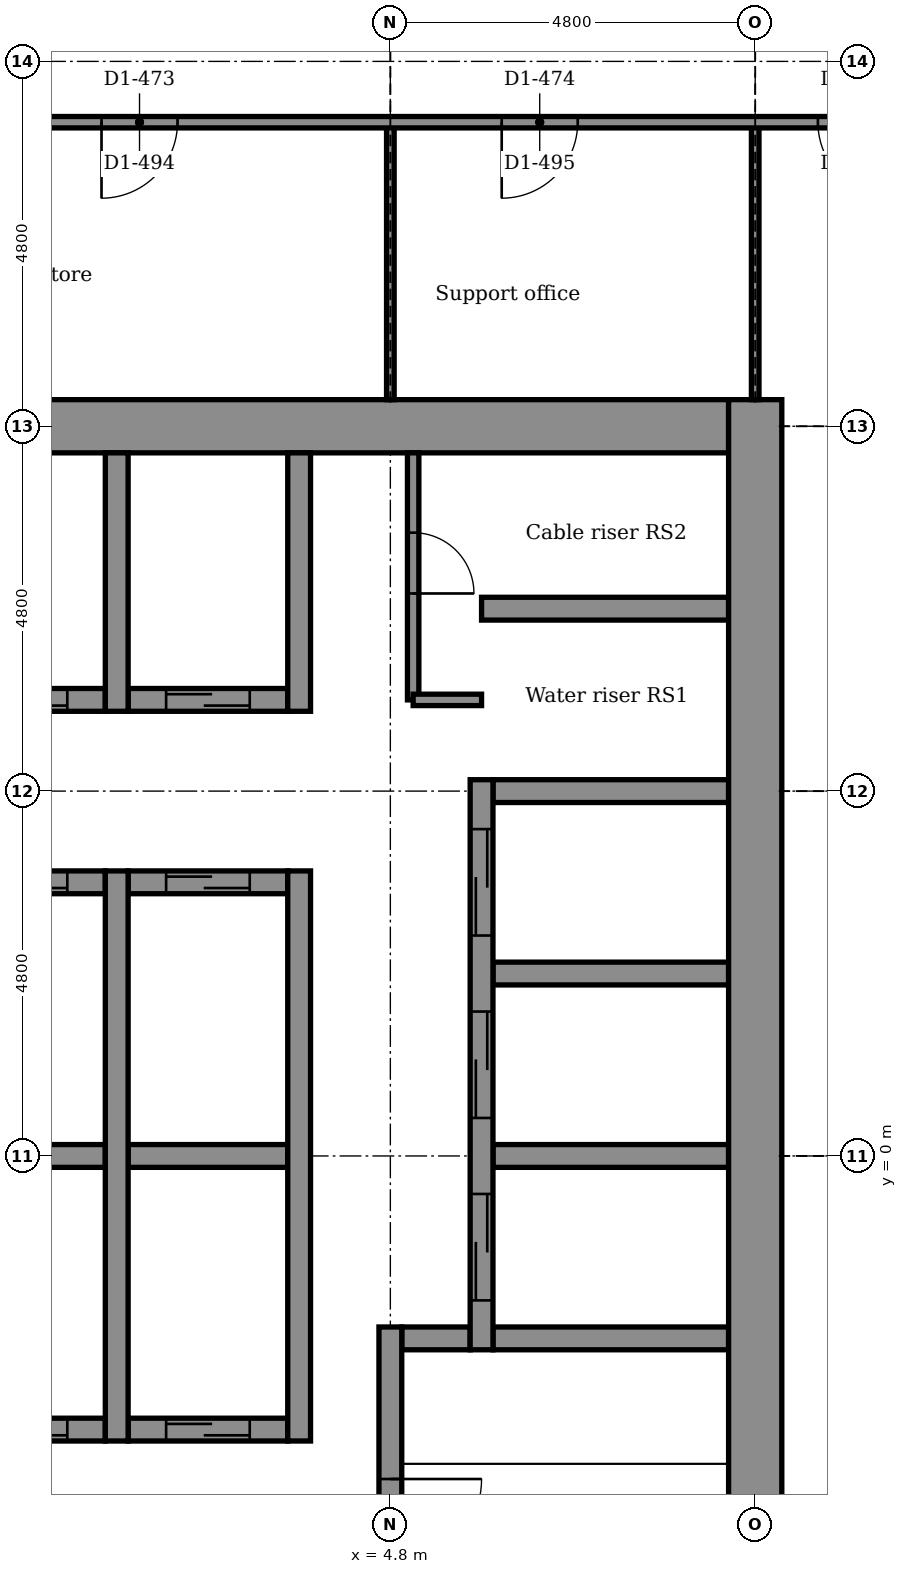
"""IFC4 building model, lengths in metres.
Left out: names, types, materials, properties, quantities, classifications, styles, units other than length and angle.
Written with IfcOpenShell. Run it as: python <this file> out.ifc"""

import sys

from ifc_helpers import new_model, si_unit, direction, frame, frame_2d, origin, place, context, subcontext, project, spatial, rectangle, extrude, element, fill, save


model = new_model("IFC4")
c1 = context("Model", 3, precision=1e-05, world=origin(), true_north=direction((0.0, 1.0)))
c2 = subcontext(c1, "Body", "Model", "MODEL_VIEW")
j1 = project(units=[si_unit("LENGTHUNIT", "METRE"), si_unit("PLANEANGLEUNIT", "RADIAN")], contexts=[c1])
p1 = place(None, origin())
s1 = spatial("IfcSite", under=j1, at=p1, CompositionType="ELEMENT")
p2 = place(p1, origin())
s2 = spatial("IfcBuilding", under=s1, at=p2, CompositionType="ELEMENT")
p3 = place(p2, frame((0.0, 0.0, 170.0)))
s3 = spatial("IfcBuildingStorey", under=s2, at=p3, CompositionType="ELEMENT", Elevation=170.0)
p4 = place(p3, frame((-1.05, -3.6, -0.15), z_axis=(0.0, 0.0, 1.0), x_axis=(1.0, 0.0, 0.0)))
e1 = element("IfcWall", 1, at=p4, inside=s3, PredefinedType="STANDARD", context=c2, shape_type="SweptSolid", body=[
    extrude(rectangle(XDim=2.1, YDim=0.3, at=frame_2d((1.05, 0.0))), origin(), (0.0, 0.0, 1.0), 3.9),
])
p5 = place(p4, frame((0.5, 0.0, 0.15)))
e2 = element("IfcOpeningElement", 2, at=p5, cuts=e1, PredefinedType="OPENING", context=c2, shape_type="SweptSolid", body=[
    extrude(rectangle(XDim=1.1, YDim=2.1, at=frame_2d((0.55, 1.05))), frame((0.0, 0.16, 0.0), z_axis=(0.0, -1.0, 0.0), x_axis=(1.0, 0.0, 0.0)), (0.0, 0.0, 1.0), 0.32),
])
p6 = place(p3, frame((1.35, -3.6, -0.15), z_axis=(0.0, 0.0, 1.0), x_axis=(1.0, 0.0, 0.0)))
e3 = element("IfcWall", 3, at=p6, inside=s3, PredefinedType="STANDARD", context=c2, shape_type="SweptSolid", body=[
    extrude(rectangle(XDim=2.1, YDim=0.3, at=frame_2d((1.05, 0.0))), origin(), (0.0, 0.0, 1.0), 3.9),
])
p7 = place(p6, frame((0.5, 0.0, 0.15)))
e4 = element("IfcOpeningElement", 4, at=p7, cuts=e3, PredefinedType="OPENING", context=c2, shape_type="SweptSolid", body=[
    extrude(rectangle(XDim=1.1, YDim=2.1, at=frame_2d((0.55, 1.05))), frame((0.0, 0.16, 0.0), z_axis=(0.0, -1.0, 0.0), x_axis=(1.0, 0.0, 0.0)), (0.0, 0.0, 1.0), 0.32),
])
p8 = place(p3, frame((4.95, -2.4, -0.15), z_axis=(0.0, 0.0, 1.0), x_axis=(1.0, 0.0, 0.0)))
e5 = element("IfcWall", 5, at=p8, inside=s3, PredefinedType="STANDARD", context=c2, shape_type="SweptSolid", body=[
    extrude(rectangle(XDim=0.9, YDim=0.3, at=frame_2d((0.45, 0.0))), origin(), (0.0, 0.0, 1.0), 3.9),
])
p9 = place(p3, frame((6.15, -2.4, -0.15), z_axis=(0.0, 0.0, 1.0), x_axis=(1.0, 0.0, 0.0)))
e6 = element("IfcWall", 6, at=p9, inside=s3, PredefinedType="STANDARD", context=c2, shape_type="SweptSolid", body=[
    extrude(rectangle(XDim=3.1, YDim=0.3, at=frame_2d((1.55, 0.0))), origin(), (0.0, 0.0, 1.0), 3.9),
])
p10 = place(p3, frame((-1.05, 0.0, -0.15), z_axis=(0.0, 0.0, 1.0), x_axis=(1.0, 0.0, 0.0)))
e7 = element("IfcWall", 7, at=p10, inside=s3, PredefinedType="STANDARD", context=c2, shape_type="SweptSolid", body=[
    extrude(rectangle(XDim=2.1, YDim=0.3, at=frame_2d((1.05, 0.0))), origin(), (0.0, 0.0, 1.0), 3.9),
])
p11 = place(p3, frame((1.35, 0.0, -0.15), z_axis=(0.0, 0.0, 1.0), x_axis=(1.0, 0.0, 0.0)))
e8 = element("IfcWall", 8, at=p11, inside=s3, PredefinedType="STANDARD", context=c2, shape_type="SweptSolid", body=[
    extrude(rectangle(XDim=2.1, YDim=0.3, at=frame_2d((1.05, 0.0))), origin(), (0.0, 0.0, 1.0), 3.9),
])
for number, where, z_axis, x_axis in (
    (9, (6.15, 0.0, -0.15), (0.0, 0.0, 1.0), (1.0, 0.0, 0.0)),
    (10, (6.15, 2.4, -0.15), (0.0, 0.0, 1.0), (1.0, 0.0, 0.0)),
):
    element("IfcWall", number, at=place(p3, frame(where, z_axis=z_axis, x_axis=x_axis)), inside=s3, PredefinedType="STANDARD", context=c2, shape_type="SweptSolid", body=[
        extrude(rectangle(XDim=3.1, YDim=0.3, at=frame_2d((1.55, 0.0))), origin(), (0.0, 0.0, 1.0), 3.9),
    ])
p12 = place(p3, frame((-1.05, 3.6, -0.15), z_axis=(0.0, 0.0, 1.0), x_axis=(1.0, 0.0, 0.0)))
e11 = element("IfcWall", 11, at=p12, inside=s3, PredefinedType="STANDARD", context=c2, shape_type="SweptSolid", body=[
    extrude(rectangle(XDim=2.1, YDim=0.3, at=frame_2d((1.05, 0.0))), origin(), (0.0, 0.0, 1.0), 3.9),
])
p13 = place(p12, frame((0.5, 0.0, 0.15)))
e12 = element("IfcOpeningElement", 12, at=p13, cuts=e11, PredefinedType="OPENING", context=c2, shape_type="SweptSolid", body=[
    extrude(rectangle(XDim=1.1, YDim=2.1, at=frame_2d((0.55, 1.05))), frame((0.0, 0.16, 0.0), z_axis=(0.0, -1.0, 0.0), x_axis=(1.0, 0.0, 0.0)), (0.0, 0.0, 1.0), 0.32),
])
p14 = place(p3, frame((1.35, 3.6, -0.15), z_axis=(0.0, 0.0, 1.0), x_axis=(1.0, 0.0, 0.0)))
e13 = element("IfcWall", 13, at=p14, inside=s3, PredefinedType="STANDARD", context=c2, shape_type="SweptSolid", body=[
    extrude(rectangle(XDim=2.1, YDim=0.3, at=frame_2d((1.05, 0.0))), origin(), (0.0, 0.0, 1.0), 3.9),
])
p15 = place(p14, frame((0.5, 0.0, 0.15)))
e14 = element("IfcOpeningElement", 14, at=p15, cuts=e13, PredefinedType="OPENING", context=c2, shape_type="SweptSolid", body=[
    extrude(rectangle(XDim=1.1, YDim=2.1, at=frame_2d((0.55, 1.05))), frame((0.0, 0.16, 0.0), z_axis=(0.0, -1.0, 0.0), x_axis=(1.0, 0.0, 0.0)), (0.0, 0.0, 1.0), 0.32),
])
p16 = place(p3, frame((6.15, 4.8, -0.15), z_axis=(0.0, 0.0, 1.0), x_axis=(1.0, 0.0, 0.0)))
e15 = element("IfcWall", 15, at=p16, inside=s3, PredefinedType="STANDARD", context=c2, shape_type="SweptSolid", body=[
    extrude(rectangle(XDim=3.1, YDim=0.3, at=frame_2d((1.55, 0.0))), origin(), (0.0, 0.0, 1.0), 3.9),
])
p17 = place(p3, frame((-1.05, 6.0, -0.15), z_axis=(0.0, 0.0, 1.0), x_axis=(1.0, 0.0, 0.0)))
e16 = element("IfcWall", 16, at=p17, inside=s3, PredefinedType="STANDARD", context=c2, shape_type="SweptSolid", body=[
    extrude(rectangle(XDim=2.1, YDim=0.3, at=frame_2d((1.05, 0.0))), origin(), (0.0, 0.0, 1.0), 3.9),
])
p18 = place(p17, frame((0.5, 0.0, 0.15)))
e17 = element("IfcOpeningElement", 17, at=p18, cuts=e16, PredefinedType="OPENING", context=c2, shape_type="SweptSolid", body=[
    extrude(rectangle(XDim=1.1, YDim=2.1, at=frame_2d((0.55, 1.05))), frame((0.0, 0.16, 0.0), z_axis=(0.0, -1.0, 0.0), x_axis=(1.0, 0.0, 0.0)), (0.0, 0.0, 1.0), 0.32),
])
p19 = place(p3, frame((1.35, 6.0, -0.15), z_axis=(0.0, 0.0, 1.0), x_axis=(1.0, 0.0, 0.0)))
e18 = element("IfcWall", 18, at=p19, inside=s3, PredefinedType="STANDARD", context=c2, shape_type="SweptSolid", body=[
    extrude(rectangle(XDim=2.1, YDim=0.3, at=frame_2d((1.05, 0.0))), origin(), (0.0, 0.0, 1.0), 3.9),
])
p20 = place(p19, frame((0.5, 0.0, 0.15)))
e19 = element("IfcOpeningElement", 19, at=p20, cuts=e18, PredefinedType="OPENING", context=c2, shape_type="SweptSolid", body=[
    extrude(rectangle(XDim=1.1, YDim=2.1, at=frame_2d((0.55, 1.05))), frame((0.0, 0.16, 0.0), z_axis=(0.0, -1.0, 0.0), x_axis=(1.0, 0.0, 0.0)), (0.0, 0.0, 1.0), 0.32),
])
p21 = place(p3, frame((6.0, 7.2, -0.15), z_axis=(0.0, 0.0, 1.0), x_axis=(1.0, 0.0, 0.0)))
e20 = element("IfcWall", 20, at=p21, inside=s3, PredefinedType="STANDARD", context=c2, shape_type="SweptSolid", body=[
    extrude(rectangle(XDim=3.25, YDim=0.3, at=frame_2d((1.625, 0.0))), origin(), (0.0, 0.0, 1.0), 3.9),
])
p22 = place(p3, frame((-5.25, 9.6, -0.15), z_axis=(0.0, 0.0, 1.0), x_axis=(1.0, 0.0, 0.0)))
e21 = element("IfcWall", 21, at=p22, inside=s3, PredefinedType="SHEAR", context=c2, shape_type="SweptSolid", body=[
    extrude(rectangle(XDim=14.5, YDim=0.7, at=frame_2d((7.25, 0.0))), origin(), (0.0, 0.0, 1.0), 3.9),
])
p23 = place(p22, frame((0.6, 0.0, 0.15)))
e22 = element("IfcOpeningElement", 22, at=p23, cuts=e21, PredefinedType="OPENING", context=c2, shape_type="SweptSolid", body=[
    extrude(rectangle(XDim=0.9, YDim=2.1, at=frame_2d((0.45, 1.05))), frame((0.0, 0.36, 0.0), z_axis=(0.0, -1.0, 0.0), x_axis=(1.0, 0.0, 0.0)), (0.0, 0.0, 1.0), 0.72),
])
p24 = place(p3, frame((1.2, -3.75, -0.15), z_axis=(0.0, 0.0, 1.0), x_axis=(0.0, 1.0, 0.0)))
e23 = element("IfcWall", 23, at=p24, inside=s3, PredefinedType="STANDARD", context=c2, shape_type="SweptSolid", body=[
    extrude(rectangle(XDim=7.5, YDim=0.3, at=frame_2d((3.75, 0.0))), origin(), (0.0, 0.0, 1.0), 3.9),
])
p25 = place(p3, frame((1.2, 5.85, -0.15), z_axis=(0.0, 0.0, 1.0), x_axis=(0.0, 1.0, 0.0)))
e24 = element("IfcWall", 24, at=p25, inside=s3, PredefinedType="STANDARD", context=c2, shape_type="SweptSolid", body=[
    extrude(rectangle(XDim=3.4, YDim=0.3, at=frame_2d((1.7, 0.0))), origin(), (0.0, 0.0, 1.0), 3.9),
])
p26 = place(p3, frame((3.6, -3.75, -0.15), z_axis=(0.0, 0.0, 1.0), x_axis=(0.0, 1.0, 0.0)))
e25 = element("IfcWall", 25, at=p26, inside=s3, PredefinedType="STANDARD", context=c2, shape_type="SweptSolid", body=[
    extrude(rectangle(XDim=7.5, YDim=0.3, at=frame_2d((3.75, 0.0))), origin(), (0.0, 0.0, 1.0), 3.9),
])
p27 = place(p3, frame((3.6, 5.85, -0.15), z_axis=(0.0, 0.0, 1.0), x_axis=(0.0, 1.0, 0.0)))
e26 = element("IfcWall", 26, at=p27, inside=s3, PredefinedType="STANDARD", context=c2, shape_type="SweptSolid", body=[
    extrude(rectangle(XDim=3.4, YDim=0.3, at=frame_2d((1.7, 0.0))), origin(), (0.0, 0.0, 1.0), 3.9),
])
p28 = place(p3, frame((4.8, -9.25, -0.15), z_axis=(0.0, 0.0, 1.0), x_axis=(0.0, 1.0, 0.0)))
e27 = element("IfcWall", 27, at=p28, inside=s3, PredefinedType="STANDARD", context=c2, shape_type="SweptSolid", body=[
    extrude(rectangle(XDim=7.0, YDim=0.3, at=frame_2d((3.5, 0.0))), origin(), (0.0, 0.0, 1.0), 3.9),
])
p29 = place(p28, frame((3.8, 0.0, 0.15)))
e28 = element("IfcOpeningElement", 28, at=p29, cuts=e27, PredefinedType="OPENING", context=c2, shape_type="SweptSolid", body=[
    extrude(rectangle(XDim=1.2, YDim=2.1, at=frame_2d((0.6, 1.05))), frame((0.0, 0.16, 0.0), z_axis=(0.0, -1.0, 0.0), x_axis=(1.0, 0.0, 0.0)), (0.0, 0.0, 1.0), 0.32),
])
p30 = place(p3, frame((6.0, -2.55, -0.15), z_axis=(0.0, 0.0, 1.0), x_axis=(0.0, 1.0, 0.0)))
e29 = element("IfcWall", 29, at=p30, inside=s3, PredefinedType="STANDARD", context=c2, shape_type="SweptSolid", body=[
    extrude(rectangle(XDim=7.5, YDim=0.3, at=frame_2d((3.75, 0.0))), origin(), (0.0, 0.0, 1.0), 3.9),
])
p31 = place(p30, frame((0.65, 0.0, 0.15)))
e30 = element("IfcOpeningElement", 30, at=p31, cuts=e29, PredefinedType="OPENING", context=c2, shape_type="SweptSolid", body=[
    extrude(rectangle(XDim=1.4, YDim=2.1, at=frame_2d((0.7, 1.05))), frame((0.0, 0.16, 0.0), z_axis=(0.0, -1.0, 0.0), x_axis=(1.0, 0.0, 0.0)), (0.0, 0.0, 1.0), 0.32),
])
p32 = place(p30, frame((3.05, 0.0, 0.15)))
e31 = element("IfcOpeningElement", 31, at=p32, cuts=e29, PredefinedType="OPENING", context=c2, shape_type="SweptSolid", body=[
    extrude(rectangle(XDim=1.4, YDim=2.1, at=frame_2d((0.7, 1.05))), frame((0.0, 0.16, 0.0), z_axis=(0.0, -1.0, 0.0), x_axis=(1.0, 0.0, 0.0)), (0.0, 0.0, 1.0), 0.32),
])
p33 = place(p30, frame((5.45, 0.0, 0.15)))
e32 = element("IfcOpeningElement", 32, at=p33, cuts=e29, PredefinedType="OPENING", context=c2, shape_type="SweptSolid", body=[
    extrude(rectangle(XDim=1.4, YDim=2.1, at=frame_2d((0.7, 1.05))), frame((0.0, 0.16, 0.0), z_axis=(0.0, -1.0, 0.0), x_axis=(1.0, 0.0, 0.0)), (0.0, 0.0, 1.0), 0.32),
])
p34 = place(p3, frame((9.6, -10.15, -0.15), z_axis=(0.0, 0.0, 1.0), x_axis=(0.0, 1.0, 0.0)))
e33 = element("IfcWall", 33, at=p34, inside=s3, PredefinedType="SHEAR", context=c2, shape_type="SweptSolid", body=[
    extrude(rectangle(XDim=20.1, YDim=0.7, at=frame_2d((10.05, 0.0))), origin(), (0.0, 0.0, 1.0), 3.9),
])
p35 = place(p3, frame((9.6, 9.95, 0.0), z_axis=(0.0, 0.0, 1.0), x_axis=(0.0, 1.0, 0.0)))
e34 = element("IfcWall", 34, at=p35, inside=s3, PredefinedType="PARTITIONING", context=c2, shape_type="SweptSolid", body=[
    extrude(rectangle(XDim=3.65, YDim=0.1, at=frame_2d((1.825, 0.0))), origin(), (0.0, 0.0, 1.0), 3.066),
])
p36 = place(p3, frame((5.1, 6.0, 0.0), z_axis=(0.0, 0.0, 1.0), x_axis=(0.0, 1.0, 0.0)))
e35 = element("IfcWall", 35, at=p36, inside=s3, PredefinedType="PARTITIONING", context=c2, shape_type="SweptSolid", body=[
    extrude(rectangle(XDim=3.25, YDim=0.15, at=frame_2d((1.625, 0.0))), origin(), (0.0, 0.0, 1.0), 3.75),
])
p37 = place(p36, frame((1.4, 0.0, 0.0)))
e36 = element("IfcOpeningElement", 36, at=p37, cuts=e35, PredefinedType="OPENING", context=c2, shape_type="SweptSolid", body=[
    extrude(rectangle(XDim=0.8, YDim=2.1, at=frame_2d((0.4, 1.05))), frame((0.0, 0.085, 0.0), z_axis=(0.0, -1.0, 0.0), x_axis=(1.0, 0.0, 0.0)), (0.0, 0.0, 1.0), 0.17),
])
p38 = place(p3, frame((4.8, 9.95, 0.0), z_axis=(0.0, 0.0, 1.0), x_axis=(0.0, 1.0, 0.0)))
e37 = element("IfcWall", 37, at=p38, inside=s3, PredefinedType="PARTITIONING", context=c2, shape_type="SweptSolid", body=[
    extrude(rectangle(XDim=3.65, YDim=0.1, at=frame_2d((1.825, 0.0))), origin(), (0.0, 0.0, 1.0), 3.066),
])
p39 = place(p3, frame((5.1, 6.0, 0.0), z_axis=(0.0, 0.0, 1.0), x_axis=(1.0, 0.0, 0.0)))
e38 = element("IfcWall", 38, at=p39, inside=s3, PredefinedType="PARTITIONING", context=c2, shape_type="SweptSolid", body=[
    extrude(rectangle(XDim=0.9, YDim=0.15, at=frame_2d((0.45, 0.0))), origin(), (0.0, 0.0, 1.0), 3.75),
])
p40 = place(p3, frame((-1.8, 13.6, 0.0), z_axis=(0.0, 0.0, 1.0), x_axis=(1.0, 0.0, 0.0)))
e39 = element("IfcWall", 39, at=p40, inside=s3, PredefinedType="PARTITIONING", context=c2, shape_type="SweptSolid", body=[
    extrude(rectangle(XDim=19.076, YDim=0.15, at=frame_2d((9.538, 0.0))), origin(), (0.0, 0.0, 1.0), 3.75),
])
p41 = place(p40, frame((2.8, 0.0, 0.0)))
e40 = element("IfcOpeningElement", 40, at=p41, cuts=e39, PredefinedType="OPENING", context=c2, shape_type="SweptSolid", body=[
    extrude(rectangle(XDim=1.0, YDim=2.1, at=frame_2d((0.5, 1.05))), frame((0.0, 0.085, 0.0), z_axis=(0.0, -1.0, 0.0), x_axis=(1.0, 0.0, 0.0)), (0.0, 0.0, 1.0), 0.17),
])
p42 = place(p40, frame((8.065, 0.0, 0.0)))
e41 = element("IfcOpeningElement", 41, at=p42, cuts=e39, PredefinedType="OPENING", context=c2, shape_type="SweptSolid", body=[
    extrude(rectangle(XDim=1.0, YDim=2.1, at=frame_2d((0.5, 1.05))), frame((0.0, 0.085, 0.0), z_axis=(0.0, -1.0, 0.0), x_axis=(1.0, 0.0, 0.0)), (0.0, 0.0, 1.0), 0.17),
])
p43 = place(p40, frame((12.225, 0.0, 0.0)))
e42 = element("IfcOpeningElement", 42, at=p43, cuts=e39, PredefinedType="OPENING", context=c2, shape_type="SweptSolid", body=[
    extrude(rectangle(XDim=1.0, YDim=2.1, at=frame_2d((0.5, 1.05))), frame((0.0, 0.085, 0.0), z_axis=(0.0, -1.0, 0.0), x_axis=(1.0, 0.0, 0.0)), (0.0, 0.0, 1.0), 0.17),
])
p44 = place(p40, frame((15.152, 0.0, 0.0)))
e43 = element("IfcOpeningElement", 43, at=p44, cuts=e39, PredefinedType="OPENING", context=c2, shape_type="SweptSolid", body=[
    extrude(rectangle(XDim=1.8, YDim=2.1, at=frame_2d((0.9, 1.05))), frame((0.0, 0.085, 0.0), z_axis=(0.0, -1.0, 0.0), x_axis=(1.0, 0.0, 0.0)), (0.0, 0.0, 1.0), 0.17),
])
p45 = place(p37, frame((0.8, 0.0, 0.0), z_axis=(0.0, 0.0, 1.0), x_axis=(-1.0, 0.0, 0.0)))
e44 = element("IfcDoor", 44, at=p45, inside=s3, OperationType="SINGLE_SWING_LEFT", PredefinedType="DOOR", context=c2, shape_type="SweptSolid", body=[
    extrude(rectangle(XDim=0.8, YDim=2.1, at=frame_2d((0.4, 1.05))), frame((0.0, 0.025, 0.0), z_axis=(0.0, -1.0, 0.0), x_axis=(1.0, 0.0, 0.0)), (0.0, 0.0, 1.0), 0.05),
])
fill(e36, e44)
p46 = place(p41, frame((1.0, 0.0, 0.0), z_axis=(0.0, 0.0, 1.0), x_axis=(-1.0, 0.0, 0.0)))
e45 = element("IfcDoor", 45, at=p46, inside=s3, OperationType="SINGLE_SWING_LEFT", PredefinedType="DOOR", context=c2, shape_type="SweptSolid", body=[
    extrude(rectangle(XDim=1.0, YDim=2.1, at=frame_2d((0.5, 1.05))), frame((0.0, 0.025, 0.0), z_axis=(0.0, -1.0, 0.0), x_axis=(1.0, 0.0, 0.0)), (0.0, 0.0, 1.0), 0.05),
])
fill(e40, e45)
p47 = place(p42, frame((1.0, 0.0, 0.0), z_axis=(0.0, 0.0, 1.0), x_axis=(-1.0, 0.0, 0.0)))
e46 = element("IfcDoor", 46, at=p47, inside=s3, OperationType="SINGLE_SWING_LEFT", PredefinedType="DOOR", context=c2, shape_type="SweptSolid", body=[
    extrude(rectangle(XDim=1.0, YDim=2.1, at=frame_2d((0.5, 1.05))), frame((0.0, 0.025, 0.0), z_axis=(0.0, -1.0, 0.0), x_axis=(1.0, 0.0, 0.0)), (0.0, 0.0, 1.0), 0.05),
])
fill(e41, e46)
p48 = place(p43, frame((1.0, 0.0, 0.0), z_axis=(0.0, 0.0, 1.0), x_axis=(-1.0, 0.0, 0.0)))
e47 = element("IfcDoor", 47, at=p48, inside=s3, OperationType="SINGLE_SWING_RIGHT", PredefinedType="DOOR", context=c2, shape_type="SweptSolid", body=[
    extrude(rectangle(XDim=1.0, YDim=2.1, at=frame_2d((0.5, 1.05))), frame((0.0, 0.025, 0.0), z_axis=(0.0, -1.0, 0.0), x_axis=(1.0, 0.0, 0.0)), (0.0, 0.0, 1.0), 0.05),
])
fill(e42, e47)
p49 = place(p31, origin())
e48 = element("IfcDoor", 48, at=p49, inside=s3, OperationType="DOUBLE_DOOR_SLIDING", PredefinedType="DOOR", context=c2, shape_type="SweptSolid", body=[
    extrude(rectangle(XDim=1.4, YDim=2.1, at=frame_2d((0.7, 1.05))), frame((0.0, 0.025, 0.0), z_axis=(0.0, -1.0, 0.0), x_axis=(1.0, 0.0, 0.0)), (0.0, 0.0, 1.0), 0.05),
])
fill(e30, e48)
p50 = place(p32, origin())
e49 = element("IfcDoor", 49, at=p50, inside=s3, OperationType="DOUBLE_DOOR_SLIDING", PredefinedType="DOOR", context=c2, shape_type="SweptSolid", body=[
    extrude(rectangle(XDim=1.4, YDim=2.1, at=frame_2d((0.7, 1.05))), frame((0.0, 0.025, 0.0), z_axis=(0.0, -1.0, 0.0), x_axis=(1.0, 0.0, 0.0)), (0.0, 0.0, 1.0), 0.05),
])
fill(e31, e49)
p51 = place(p33, origin())
e50 = element("IfcDoor", 50, at=p51, inside=s3, OperationType="DOUBLE_DOOR_SLIDING", PredefinedType="DOOR", context=c2, shape_type="SweptSolid", body=[
    extrude(rectangle(XDim=1.4, YDim=2.1, at=frame_2d((0.7, 1.05))), frame((0.0, 0.025, 0.0), z_axis=(0.0, -1.0, 0.0), x_axis=(1.0, 0.0, 0.0)), (0.0, 0.0, 1.0), 0.05),
])
fill(e32, e50)
p52 = place(p18, origin())
e51 = element("IfcDoor", 51, at=p52, inside=s3, OperationType="DOUBLE_DOOR_SLIDING", PredefinedType="DOOR", context=c2, shape_type="SweptSolid", body=[
    extrude(rectangle(XDim=1.1, YDim=2.1, at=frame_2d((0.55, 1.05))), frame((0.0, 0.025, 0.0), z_axis=(0.0, -1.0, 0.0), x_axis=(1.0, 0.0, 0.0)), (0.0, 0.0, 1.0), 0.05),
])
fill(e17, e51)
p53 = place(p20, origin())
e52 = element("IfcDoor", 52, at=p53, inside=s3, OperationType="DOUBLE_DOOR_SLIDING", PredefinedType="DOOR", context=c2, shape_type="SweptSolid", body=[
    extrude(rectangle(XDim=1.1, YDim=2.1, at=frame_2d((0.55, 1.05))), frame((0.0, 0.025, 0.0), z_axis=(0.0, -1.0, 0.0), x_axis=(1.0, 0.0, 0.0)), (0.0, 0.0, 1.0), 0.05),
])
fill(e19, e52)
p54 = place(p13, origin())
e53 = element("IfcDoor", 53, at=p54, inside=s3, OperationType="DOUBLE_DOOR_SLIDING", PredefinedType="DOOR", context=c2, shape_type="SweptSolid", body=[
    extrude(rectangle(XDim=1.1, YDim=2.1, at=frame_2d((0.55, 1.05))), frame((0.0, 0.025, 0.0), z_axis=(0.0, -1.0, 0.0), x_axis=(1.0, 0.0, 0.0)), (0.0, 0.0, 1.0), 0.05),
])
fill(e12, e53)
p55 = place(p15, origin())
e54 = element("IfcDoor", 54, at=p55, inside=s3, OperationType="DOUBLE_DOOR_SLIDING", PredefinedType="DOOR", context=c2, shape_type="SweptSolid", body=[
    extrude(rectangle(XDim=1.1, YDim=2.1, at=frame_2d((0.55, 1.05))), frame((0.0, 0.025, 0.0), z_axis=(0.0, -1.0, 0.0), x_axis=(1.0, 0.0, 0.0)), (0.0, 0.0, 1.0), 0.05),
])
fill(e14, e54)
p56 = place(p5, origin())
e55 = element("IfcDoor", 55, at=p56, inside=s3, OperationType="DOUBLE_DOOR_SLIDING", PredefinedType="DOOR", context=c2, shape_type="SweptSolid", body=[
    extrude(rectangle(XDim=1.1, YDim=2.1, at=frame_2d((0.55, 1.05))), frame((0.0, 0.025, 0.0), z_axis=(0.0, -1.0, 0.0), x_axis=(1.0, 0.0, 0.0)), (0.0, 0.0, 1.0), 0.05),
])
fill(e2, e55)
p57 = place(p7, origin())
e56 = element("IfcDoor", 56, at=p57, inside=s3, OperationType="DOUBLE_DOOR_SLIDING", PredefinedType="DOOR", context=c2, shape_type="SweptSolid", body=[
    extrude(rectangle(XDim=1.1, YDim=2.1, at=frame_2d((0.55, 1.05))), frame((0.0, 0.025, 0.0), z_axis=(0.0, -1.0, 0.0), x_axis=(1.0, 0.0, 0.0)), (0.0, 0.0, 1.0), 0.05),
])
fill(e4, e56)
p58 = place(p29, frame((1.2, 0.0, 0.0), z_axis=(0.0, 0.0, 1.0), x_axis=(-1.0, 0.0, 0.0)))
e57 = element("IfcDoor", 57, at=p58, inside=s3, OperationType="SINGLE_SWING_RIGHT", PredefinedType="DOOR", context=c2, shape_type="SweptSolid", body=[
    extrude(rectangle(XDim=1.2, YDim=2.1, at=frame_2d((0.6, 1.05))), frame((0.0, 0.025, 0.0), z_axis=(0.0, -1.0, 0.0), x_axis=(1.0, 0.0, 0.0)), (0.0, 0.0, 1.0), 0.05),
])
fill(e28, e57)
save(model, sys.argv[1])
